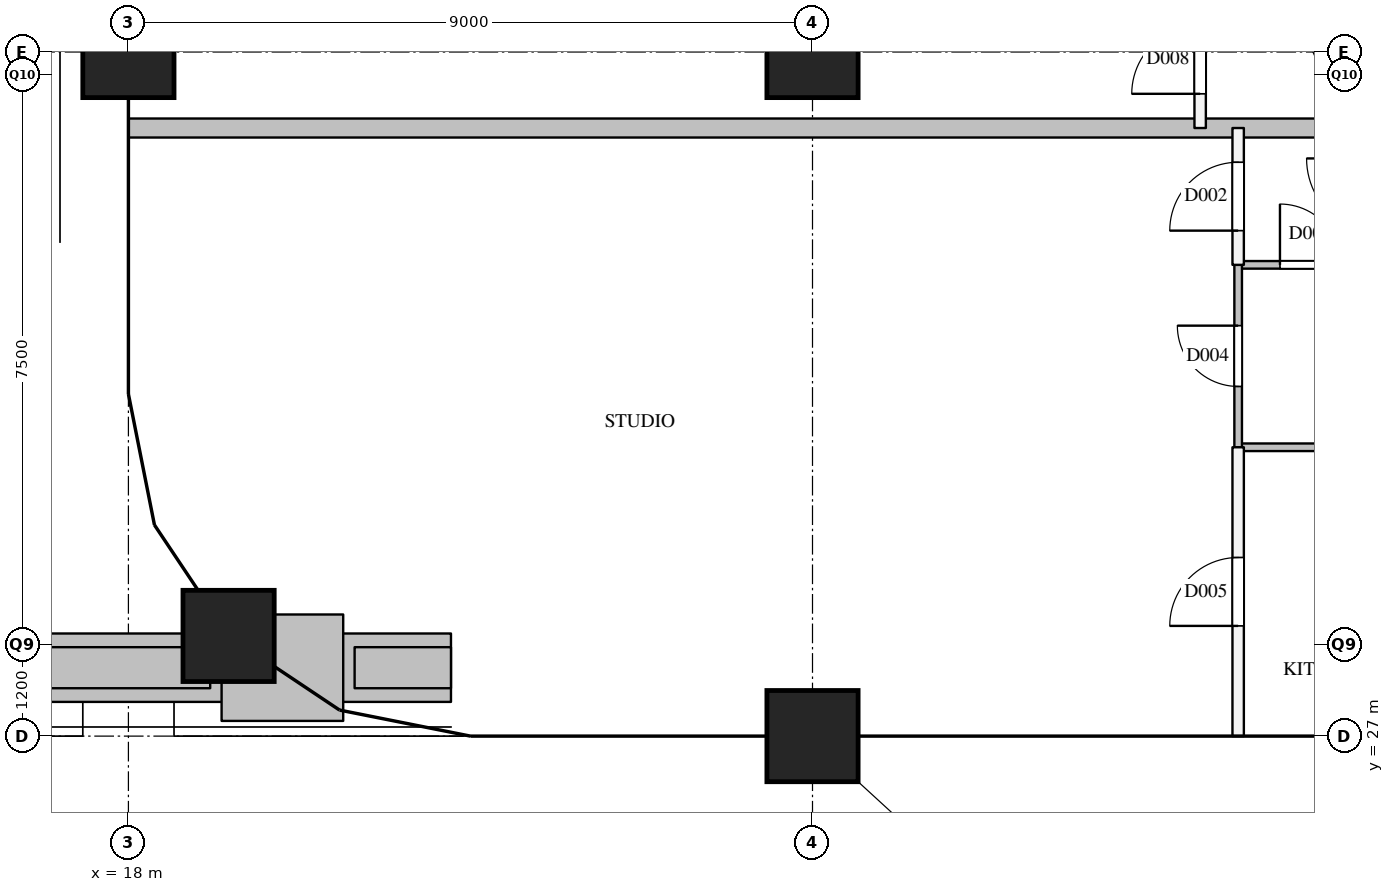
"""IFC4 building model, lengths in metres.
Left out: names, types, materials, properties, quantities, classifications, styles, units other than length and angle.
Written with IfcOpenShell. Run it as: python <this file> out.ifc"""

import sys

from ifc_helpers import new_model, si_unit, direction, frame, frame_2d, origin, origin_2d, place, context, subcontext, project, spatial, rectangle, extrude, element, fill, save


model = new_model("IFC4")
c1 = context("Model", 3, precision=1e-05, world=origin(), true_north=direction((0.0, 1.0)))
c2 = subcontext(c1, "Body", "Model", "MODEL_VIEW")
j1 = project(units=[si_unit("LENGTHUNIT", "METRE"), si_unit("PLANEANGLEUNIT", "RADIAN")], contexts=[c1])
p1 = place(None, origin())
s1 = spatial("IfcSite", under=j1, at=p1, CompositionType="ELEMENT")
p2 = place(p1, origin())
s2 = spatial("IfcBuilding", under=s1, at=p2, CompositionType="ELEMENT")
p3 = place(p2, frame((0.0, 0.0, 234.5)))
s3 = spatial("IfcBuildingStorey", under=s2, at=p3, CompositionType="ELEMENT", Elevation=234.5)
for number, where, z_axis, x_axis in (
    (1, (19.318, 28.318, 0.0), (0.0, 0.0, 1.0), (1.0, 0.0, 0.0)),
    (2, (18.0, 36.0, 0.0), (0.0, 0.0, 1.0), (1.0, 0.0, 0.0)),
    (3, (27.0, 27.0, 0.0), (0.0, 0.0, 1.0), (1.0, 0.0, 0.0)),
    (4, (27.0, 36.0, 0.0), (0.0, 0.0, 1.0), (1.0, 0.0, 0.0)),
):
    element("IfcColumn", number, at=place(p3, frame(where, z_axis=z_axis, x_axis=x_axis)), inside=s3, PredefinedType="COLUMN", context=c2, shape_type="SweptSolid", body=[
        extrude(rectangle(XDim=1.2, YDim=1.2, at=origin_2d()), origin(), (0.0, 0.0, 1.0), 3.9),
    ])
p4 = place(p3, frame((22.244, 27.9, 0.0), z_axis=(0.0, 0.0, 1.0), x_axis=(-1.0, 0.0, 0.0)))
e5 = element("IfcWall", 5, at=p4, inside=s3, PredefinedType="SOLIDWALL", context=c2, shape_type="SweptSolid", body=[
    extrude(rectangle(XDim=17.743, YDim=0.9, at=frame_2d((8.871, 0.0))), origin(), (0.0, 0.0, 1.0), 0.6),
])
p5 = place(p3, frame((22.244, 27.9, 0.6), z_axis=(0.0, 0.0, 1.0), x_axis=(-1.0, 0.0, 0.0)))
e6 = element("IfcWall", 6, at=p5, inside=s3, PredefinedType="SOLIDWALL", context=c2, shape_type="SweptSolid", body=[
    extrude(rectangle(XDim=1.268, YDim=0.54, at=frame_2d((0.634, 0.0))), origin(), (0.0, 0.0, 1.0), 0.75),
])
p6 = place(p3, frame((19.076, 27.9, 0.6), z_axis=(0.0, 0.0, 1.0), x_axis=(-1.0, 0.0, 0.0)))
e7 = element("IfcWall", 7, at=p6, inside=s3, PredefinedType="SOLIDWALL", context=c2, shape_type="SweptSolid", body=[
    extrude(rectangle(XDim=2.536, YDim=0.54, at=frame_2d((1.268, 0.0))), origin(), (0.0, 0.0, 1.0), 0.75),
])
p7 = place(p3, frame((20.826, 27.9, 0.6), z_axis=(0.0, 0.0, 1.0), x_axis=(-1.0, 0.0, 0.0)))
e8 = element("IfcWall", 8, at=p7, inside=s3, PredefinedType="SOLIDWALL", context=c2, shape_type="SweptSolid", body=[
    extrude(rectangle(XDim=1.6, YDim=1.4, at=frame_2d((0.8, 0.0))), origin(), (0.0, 0.0, 1.0), 2.6),
])
p8 = place(p3, frame((32.1, 35.0, 0.0), z_axis=(0.0, 0.0, 1.0), x_axis=(0.0, 1.0, 0.0)))
e9 = element("IfcWall", 9, at=p8, inside=s3, PredefinedType="PARTITIONING", context=c2, shape_type="SweptSolid", body=[
    extrude(rectangle(XDim=1.8, YDim=0.15, at=frame_2d((0.9, 0.0))), origin(), (0.0, 0.0, 1.0), 3.6),
])
p9 = place(p8, frame((0.45, 0.0, 0.0)))
e10 = element("IfcOpeningElement", 10, at=p9, cuts=e9, PredefinedType="OPENING", context=c2, shape_type="SweptSolid", body=[
    extrude(rectangle(XDim=0.9, YDim=2.1, at=frame_2d((0.45, 1.05))), frame((0.0, 0.085, 0.0), z_axis=(0.0, -1.0, 0.0), x_axis=(1.0, 0.0, 0.0)), (0.0, 0.0, 1.0), 0.17),
])
p10 = place(p3, frame((32.6, 27.0, 0.0), z_axis=(0.0, 0.0, 1.0), x_axis=(0.0, 1.0, 0.0)))
e11 = element("IfcWall", 11, at=p10, inside=s3, PredefinedType="PARTITIONING", context=c2, shape_type="SweptSolid", body=[
    extrude(rectangle(XDim=3.8, YDim=0.15, at=frame_2d((1.9, 0.0))), origin(), (0.0, 0.0, 1.0), 2.6),
])
p11 = place(p10, frame((1.45, 0.0, 0.0)))
e12 = element("IfcOpeningElement", 12, at=p11, cuts=e11, PredefinedType="OPENING", context=c2, shape_type="SweptSolid", body=[
    extrude(rectangle(XDim=0.9, YDim=2.1, at=frame_2d((0.45, 1.05))), frame((0.0, 0.085, 0.0), z_axis=(0.0, -1.0, 0.0), x_axis=(1.0, 0.0, 0.0)), (0.0, 0.0, 1.0), 0.17),
])
p12 = place(p3, frame((32.6, 33.2, 0.0), z_axis=(0.0, 0.0, 1.0), x_axis=(0.0, 1.0, 0.0)))
e13 = element("IfcWall", 13, at=p12, inside=s3, PredefinedType="PARTITIONING", context=c2, shape_type="SweptSolid", body=[
    extrude(rectangle(XDim=1.8, YDim=0.15, at=frame_2d((0.9, 0.0))), origin(), (0.0, 0.0, 1.0), 3.6),
])
p13 = place(p12, frame((0.45, 0.0, 0.0)))
e14 = element("IfcOpeningElement", 14, at=p13, cuts=e13, PredefinedType="OPENING", context=c2, shape_type="SweptSolid", body=[
    extrude(rectangle(XDim=0.9, YDim=2.1, at=frame_2d((0.45, 1.05))), frame((0.0, 0.085, 0.0), z_axis=(0.0, -1.0, 0.0), x_axis=(1.0, 0.0, 0.0)), (0.0, 0.0, 1.0), 0.17),
])
p14 = place(p3, frame((18.0, 35.0, 0.0), z_axis=(0.0, 0.0, 1.0), x_axis=(1.0, 0.0, 0.0)))
e15 = element("IfcWall", 15, at=p14, inside=s3, PredefinedType="PARTITIONING", context=c2, shape_type="SweptSolid", body=[
    extrude(rectangle(XDim=16.5, YDim=0.25, at=frame_2d((8.25, 0.0))), origin(), (0.0, 0.0, 1.0), 2.6),
])
p15 = place(p3, frame((32.6, 30.8, 0.0), z_axis=(0.0, 0.0, 1.0), x_axis=(1.0, 0.0, 0.0)))
e16 = element("IfcWall", 16, at=p15, inside=s3, PredefinedType="PARTITIONING", context=c2, shape_type="SweptSolid", body=[
    extrude(rectangle(XDim=1.9, YDim=0.1, at=frame_2d((0.95, 0.0))), origin(), (0.0, 0.0, 1.0), 3.6),
])
p16 = place(p3, frame((32.6, 33.2, 0.0), z_axis=(0.0, 0.0, 1.0), x_axis=(1.0, 0.0, 0.0)))
e17 = element("IfcWall", 17, at=p16, inside=s3, PredefinedType="PARTITIONING", context=c2, shape_type="SweptSolid", body=[
    extrude(rectangle(XDim=1.9, YDim=0.1, at=frame_2d((0.95, 0.0))), origin(), (0.0, 0.0, 1.0), 3.6),
])
p17 = place(p16, frame((0.55, 0.0, 0.0)))
e18 = element("IfcOpeningElement", 18, at=p17, cuts=e17, PredefinedType="OPENING", context=c2, shape_type="SweptSolid", body=[
    extrude(rectangle(XDim=0.8, YDim=2.1, at=frame_2d((0.4, 1.05))), frame((0.0, 0.06, 0.0), z_axis=(0.0, -1.0, 0.0), x_axis=(1.0, 0.0, 0.0)), (0.0, 0.0, 1.0), 0.12),
])
p18 = place(p3, frame((32.6, 30.8, 0.0), z_axis=(0.0, 0.0, 1.0), x_axis=(0.0, 1.0, 0.0)))
e19 = element("IfcWall", 19, at=p18, inside=s3, PredefinedType="PARTITIONING", context=c2, shape_type="SweptSolid", body=[
    extrude(rectangle(XDim=2.4, YDim=0.1, at=frame_2d((1.2, 0.0))), origin(), (0.0, 0.0, 1.0), 3.6),
])
p19 = place(p18, frame((0.8, 0.0, 0.0)))
e20 = element("IfcOpeningElement", 20, at=p19, cuts=e19, PredefinedType="OPENING", context=c2, shape_type="SweptSolid", body=[
    extrude(rectangle(XDim=0.8, YDim=2.1, at=frame_2d((0.4, 1.05))), frame((0.0, 0.06, 0.0), z_axis=(0.0, -1.0, 0.0), x_axis=(1.0, 0.0, 0.0)), (0.0, 0.0, 1.0), 0.12),
])
p20 = place(p13, origin())
e21 = element("IfcDoor", 21, at=p20, inside=s3, OperationType="SINGLE_SWING_LEFT", PredefinedType="DOOR", context=c2, shape_type="SweptSolid", body=[
    extrude(rectangle(XDim=0.9, YDim=2.1, at=frame_2d((0.45, 1.05))), frame((0.0, 0.025, 0.0), z_axis=(0.0, -1.0, 0.0), x_axis=(1.0, 0.0, 0.0)), (0.0, 0.0, 1.0), 0.05),
])
fill(e14, e21)
p21 = place(p17, origin())
e22 = element("IfcDoor", 22, at=p21, inside=s3, OperationType="SINGLE_SWING_LEFT", PredefinedType="DOOR", context=c2, shape_type="SweptSolid", body=[
    extrude(rectangle(XDim=0.8, YDim=2.1, at=frame_2d((0.4, 1.05))), frame((0.0, 0.025, 0.0), z_axis=(0.0, -1.0, 0.0), x_axis=(1.0, 0.0, 0.0)), (0.0, 0.0, 1.0), 0.05),
])
fill(e18, e22)
p22 = place(p19, origin())
e23 = element("IfcDoor", 23, at=p22, inside=s3, OperationType="SINGLE_SWING_RIGHT", PredefinedType="DOOR", context=c2, shape_type="SweptSolid", body=[
    extrude(rectangle(XDim=0.8, YDim=2.1, at=frame_2d((0.4, 1.05))), frame((0.0, 0.025, 0.0), z_axis=(0.0, -1.0, 0.0), x_axis=(1.0, 0.0, 0.0)), (0.0, 0.0, 1.0), 0.05),
])
fill(e20, e23)
p23 = place(p11, origin())
e24 = element("IfcDoor", 24, at=p23, inside=s3, OperationType="SINGLE_SWING_LEFT", PredefinedType="DOOR", context=c2, shape_type="SweptSolid", body=[
    extrude(rectangle(XDim=0.9, YDim=2.1, at=frame_2d((0.45, 1.05))), frame((0.0, 0.025, 0.0), z_axis=(0.0, -1.0, 0.0), x_axis=(1.0, 0.0, 0.0)), (0.0, 0.0, 1.0), 0.05),
])
fill(e12, e24)
p24 = place(p9, origin())
e25 = element("IfcDoor", 25, at=p24, inside=s3, OperationType="SINGLE_SWING_LEFT", PredefinedType="DOOR", context=c2, shape_type="SweptSolid", body=[
    extrude(rectangle(XDim=0.9, YDim=2.1, at=frame_2d((0.45, 1.05))), frame((0.0, 0.025, 0.0), z_axis=(0.0, -1.0, 0.0), x_axis=(1.0, 0.0, 0.0)), (0.0, 0.0, 1.0), 0.05),
])
fill(e10, e25)
save(model, sys.argv[1])
